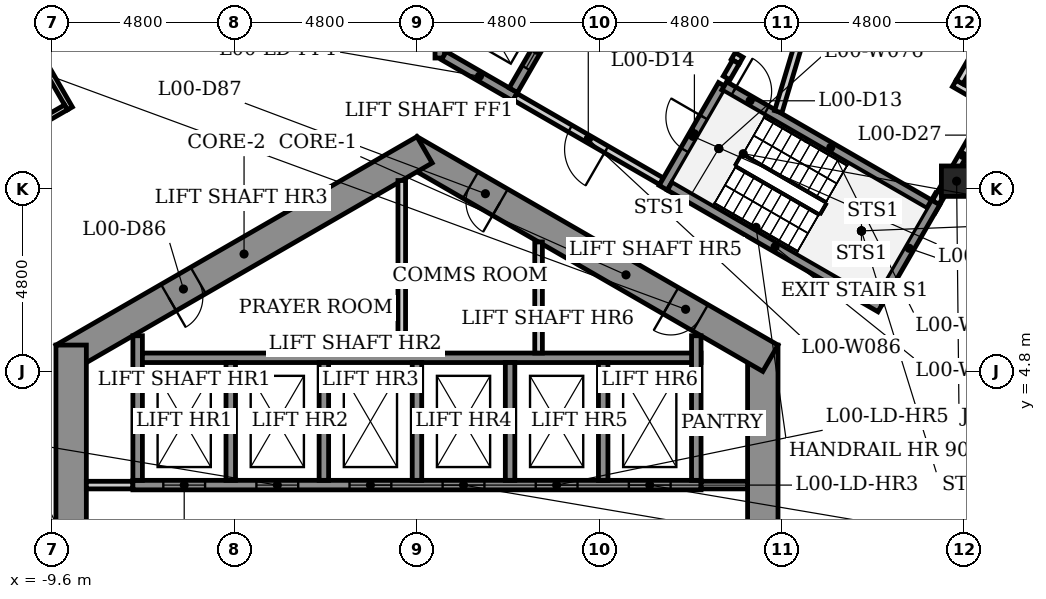
"""IFC4 building model, lengths in metres.
Left out: names, types, materials, properties, quantities, classifications, styles, units other than length and angle.
Written with IfcOpenShell. Run it as: python <this file> out.ifc"""

import sys

from ifc_helpers import new_model, si_unit, direction, frame, frame_2d, origin, origin_2d, place, context, subcontext, project, spatial, rectangle, extrude, element, fill, save


model = new_model("IFC4")
c1 = context("Model", 3, precision=1e-05, world=origin(), true_north=direction((0.0, 1.0)))
c2 = subcontext(c1, "Body", "Model", "MODEL_VIEW")
j1 = project(units=[si_unit("LENGTHUNIT", "METRE"), si_unit("PLANEANGLEUNIT", "RADIAN")], contexts=[c1])
p1 = place(None, origin())
s1 = spatial("IfcSite", under=j1, at=p1, CompositionType="ELEMENT")
p2 = place(p1, origin())
s2 = spatial("IfcBuilding", under=s1, at=p2, CompositionType="ELEMENT")
p3 = place(p2, origin())
s3 = spatial("IfcBuildingStorey", under=s2, at=p3, CompositionType="ELEMENT", Elevation=0.0)
p4 = place(p3, frame((9.1, -5.485, -0.5), z_axis=(0.0, 0.0, 1.0), x_axis=(0.0, 1.0, 0.0)))
e1 = element("IfcWall", 1, at=p4, inside=s3, PredefinedType="SHEAR", context=c2, shape_type="SweptSolid", body=[
    extrude(rectangle(XDim=10.97, YDim=0.8, at=frame_2d((5.485, 0.0))), origin(), (0.0, 0.0, 1.0), 7.5),
])
p5 = place(p4, frame((4.685, 0.0, 0.5)))
e2 = element("IfcOpeningElement", 2, at=p5, cuts=e1, PredefinedType="OPENING", context=c2, shape_type="SweptSolid", body=[
    extrude(rectangle(XDim=1.6, YDim=2.1, at=frame_2d((0.8, 1.05))), frame((0.0, 0.41, 0.0), z_axis=(0.0, -1.0, 0.0), x_axis=(1.0, 0.0, 0.0)), (0.0, 0.0, 1.0), 0.82),
])
p6 = place(p3, frame((9.3, 5.138, -0.5), z_axis=(0.0, 0.0, 1.0), x_axis=(-0.866023993627, 0.500002442456, 0.0)))
e3 = element("IfcWall", 3, at=p6, inside=s3, PredefinedType="SHEAR", context=c2, shape_type="SweptSolid", body=[
    extrude(rectangle(XDim=10.97, YDim=0.8, at=frame_2d((5.485, 0.0))), origin(), (0.0, 0.0, 1.0), 7.5),
])
p7 = place(p6, frame((8.21, 0.0, 0.5)))
e4 = element("IfcOpeningElement", 4, at=p7, cuts=e3, PredefinedType="OPENING", context=c2, shape_type="SweptSolid", body=[
    extrude(rectangle(XDim=0.9, YDim=2.1, at=frame_2d((0.45, 1.05))), frame((0.0, 0.41, 0.0), z_axis=(0.0, -1.0, 0.0), x_axis=(1.0, 0.0, 0.0)), (0.0, 0.0, 1.0), 0.82),
])
p8 = place(p6, frame((2.126, 0.0, 0.5)))
e5 = element("IfcOpeningElement", 5, at=p8, cuts=e3, PredefinedType="OPENING", context=c2, shape_type="SweptSolid", body=[
    extrude(rectangle(XDim=0.9, YDim=2.1, at=frame_2d((0.45, 1.05))), frame((0.0, 0.41, 0.0), z_axis=(0.0, -1.0, 0.0), x_axis=(1.0, 0.0, 0.0)), (0.0, 0.0, 1.0), 0.82),
])
p9 = place(p3, frame((0.2, 10.623, -0.5), z_axis=(0.0, 0.0, 1.0), x_axis=(-0.866023993627, -0.500002442456, 0.0)))
e6 = element("IfcWall", 6, at=p9, inside=s3, PredefinedType="SHEAR", context=c2, shape_type="SweptSolid", body=[
    extrude(rectangle(XDim=10.97, YDim=0.8, at=frame_2d((5.485, 0.0))), origin(), (0.0, 0.0, 1.0), 7.5),
])
p10 = place(p9, frame((6.877, 0.0, 0.5)))
e7 = element("IfcOpeningElement", 7, at=p10, cuts=e6, PredefinedType="OPENING", context=c2, shape_type="SweptSolid", body=[
    extrude(rectangle(XDim=0.9, YDim=2.1, at=frame_2d((0.45, 1.05))), frame((0.0, 0.41, 0.0), z_axis=(0.0, -1.0, 0.0), x_axis=(1.0, 0.0, 0.0)), (0.0, 0.0, 1.0), 0.82),
])
p11 = place(p3, frame((-9.1, 5.485, -0.5), z_axis=(0.0, 0.0, 1.0), x_axis=(0.0, -1.0, 0.0)))
e8 = element("IfcWall", 8, at=p11, inside=s3, PredefinedType="SHEAR", context=c2, shape_type="SweptSolid", body=[
    extrude(rectangle(XDim=10.97, YDim=0.8, at=frame_2d((5.485, 0.0))), origin(), (0.0, 0.0, 1.0), 7.5),
])
p12 = place(p11, frame((4.685, 0.0, 0.5)))
e9 = element("IfcOpeningElement", 9, at=p12, cuts=e8, PredefinedType="OPENING", context=c2, shape_type="SweptSolid", body=[
    extrude(rectangle(XDim=1.6, YDim=2.1, at=frame_2d((0.8, 1.05))), frame((0.0, 0.41, 0.0), z_axis=(0.0, -1.0, 0.0), x_axis=(1.0, 0.0, 0.0)), (0.0, 0.0, 1.0), 0.82),
])
p13 = place(p3, frame((14.2, 9.798, -0.5), z_axis=(0.0, 0.0, 1.0), x_axis=(1.0, 0.0, 0.0)))
e10 = element("IfcColumn", 10, at=p13, inside=s3, PredefinedType="COLUMN", context=c2, shape_type="SweptSolid", body=[
    extrude(rectangle(XDim=0.8, YDim=0.8, at=origin_2d()), origin(), (0.0, 0.0, 1.0), 7.5),
])
p14 = place(p3, frame((-10.208, 13.574, 0.0), z_axis=(0.0, 0.0, 1.0), x_axis=(0.499961633463, -0.866047553582, 0.0)))
e11 = element("IfcWall", 11, at=p14, inside=s3, PredefinedType="PARTITIONING", context=c2, shape_type="SweptSolid", body=[
    extrude(rectangle(XDim=2.15, YDim=0.15, at=frame_2d((1.075, 0.0))), origin(), (0.0, 0.0, 1.0), 6.6),
])
p15 = place(p3, frame((-9.236, 11.74, 0.0), z_axis=(0.0, 0.0, 1.0), x_axis=(-0.86604190943, -0.499971410293, 0.0)))
e12 = element("IfcWall", 12, at=p15, inside=s3, PredefinedType="PARTITIONING", context=c2, shape_type="SweptSolid", body=[
    extrude(rectangle(XDim=8.064, YDim=0.15, at=frame_2d((4.032, 0.0))), origin(), (0.0, 0.0, 1.0), 6.6),
])
p16 = place(p15, frame((2.132, 0.0, 0.0)))
e13 = element("IfcOpeningElement", 13, at=p16, cuts=e12, PredefinedType="OPENING", context=c2, shape_type="SweptSolid", body=[
    extrude(rectangle(XDim=1.6, YDim=2.1, at=frame_2d((0.8, 1.05))), frame((0.0, 0.085, 0.0), z_axis=(0.0, -1.0, 0.0), x_axis=(1.0, 0.0, 0.0)), (0.0, 0.0, 1.0), 0.17),
])
p17 = place(p3, frame((-8.7, 1.8, 0.0), z_axis=(0.0, 0.0, 1.0), x_axis=(1.0, 0.0, 0.0)))
e14 = element("IfcWall", 14, at=p17, inside=s3, PredefinedType="PARTITIONING", context=c2, shape_type="SweptSolid", body=[
    extrude(rectangle(XDim=1.225, YDim=0.2, at=frame_2d((0.613, 0.0))), origin(), (0.0, 0.0, 1.0), 6.6),
])
p18 = place(p3, frame((-7.475, 1.8, 0.0), z_axis=(0.0, 0.0, 1.0), x_axis=(1.0, 0.0, 0.0)))
e15 = element("IfcWall", 15, at=p18, inside=s3, PredefinedType="SHEAR", context=c2, shape_type="SweptSolid", body=[
    extrude(rectangle(XDim=14.95, YDim=0.25, at=frame_2d((7.475, 0.0))), origin(), (0.0, 0.0, 1.0), 6.6),
])
p19 = place(p18, frame((0.8, 0.0, 0.0)))
e16 = element("IfcOpeningElement", 16, at=p19, cuts=e15, PredefinedType="OPENING", context=c2, shape_type="SweptSolid", body=[
    extrude(rectangle(XDim=1.1, YDim=2.1, at=frame_2d((0.55, 1.05))), frame((0.0, 0.135, 0.0), z_axis=(0.0, -1.0, 0.0), x_axis=(1.0, 0.0, 0.0)), (0.0, 0.0, 1.0), 0.27),
])
p20 = place(p18, frame((3.25, 0.0, 0.0)))
e17 = element("IfcOpeningElement", 17, at=p20, cuts=e15, PredefinedType="OPENING", context=c2, shape_type="SweptSolid", body=[
    extrude(rectangle(XDim=1.1, YDim=2.1, at=frame_2d((0.55, 1.05))), frame((0.0, 0.135, 0.0), z_axis=(0.0, -1.0, 0.0), x_axis=(1.0, 0.0, 0.0)), (0.0, 0.0, 1.0), 0.27),
])
p21 = place(p18, frame((5.7, 0.0, 0.0)))
e18 = element("IfcOpeningElement", 18, at=p21, cuts=e15, PredefinedType="OPENING", context=c2, shape_type="SweptSolid", body=[
    extrude(rectangle(XDim=1.1, YDim=2.1, at=frame_2d((0.55, 1.05))), frame((0.0, 0.135, 0.0), z_axis=(0.0, -1.0, 0.0), x_axis=(1.0, 0.0, 0.0)), (0.0, 0.0, 1.0), 0.27),
])
p22 = place(p18, frame((8.15, 0.0, 0.0)))
e19 = element("IfcOpeningElement", 19, at=p22, cuts=e15, PredefinedType="OPENING", context=c2, shape_type="SweptSolid", body=[
    extrude(rectangle(XDim=1.1, YDim=2.1, at=frame_2d((0.55, 1.05))), frame((0.0, 0.135, 0.0), z_axis=(0.0, -1.0, 0.0), x_axis=(1.0, 0.0, 0.0)), (0.0, 0.0, 1.0), 0.27),
])
p23 = place(p18, frame((10.6, 0.0, 0.0)))
e20 = element("IfcOpeningElement", 20, at=p23, cuts=e15, PredefinedType="OPENING", context=c2, shape_type="SweptSolid", body=[
    extrude(rectangle(XDim=1.1, YDim=2.1, at=frame_2d((0.55, 1.05))), frame((0.0, 0.135, 0.0), z_axis=(0.0, -1.0, 0.0), x_axis=(1.0, 0.0, 0.0)), (0.0, 0.0, 1.0), 0.27),
])
p24 = place(p18, frame((13.05, 0.0, 0.0)))
e21 = element("IfcOpeningElement", 21, at=p24, cuts=e15, PredefinedType="OPENING", context=c2, shape_type="SweptSolid", body=[
    extrude(rectangle(XDim=1.1, YDim=2.1, at=frame_2d((0.55, 1.05))), frame((0.0, 0.135, 0.0), z_axis=(0.0, -1.0, 0.0), x_axis=(1.0, 0.0, 0.0)), (0.0, 0.0, 1.0), 0.27),
])
p25 = place(p3, frame((-7.35, 1.925, 0.0), z_axis=(0.0, 0.0, 1.0), x_axis=(0.0, 1.0, 0.0)))
e22 = element("IfcWall", 22, at=p25, inside=s3, PredefinedType="SHEAR", context=c2, shape_type="SweptSolid", body=[
    extrude(rectangle(XDim=3.805, YDim=0.25, at=frame_2d((1.903, 0.0))), origin(), (0.0, 0.0, 1.0), 6.6),
])
p26 = place(p3, frame((-7.225, 5.15, 0.0), z_axis=(0.0, 0.0, 1.0), x_axis=(1.0, 0.0, 0.0)))
e23 = element("IfcWall", 23, at=p26, inside=s3, PredefinedType="SHEAR", context=c2, shape_type="SweptSolid", body=[
    extrude(rectangle(XDim=14.7, YDim=0.25, at=frame_2d((7.35, 0.0))), origin(), (0.0, 0.0, 1.0), 6.6),
])
for number, where, z_axis, x_axis in (
    (24, (-4.9, 5.025, 0.0), (0.0, 0.0, 1.0), (0.0, -1.0, 0.0)),
    (25, (-2.45, 5.025, 0.0), (0.0, 0.0, 1.0), (0.0, -1.0, 0.0)),
):
    element("IfcWall", number, at=place(p3, frame(where, z_axis=z_axis, x_axis=x_axis)), inside=s3, PredefinedType="SHEAR", context=c2, shape_type="SweptSolid", body=[
        extrude(rectangle(XDim=3.1, YDim=0.25, at=frame_2d((1.55, 0.0))), origin(), (0.0, 0.0, 1.0), 7.0),
    ])
p27 = place(p3, frame((-0.4, 9.815, 0.0), z_axis=(0.0, 0.0, 1.0), x_axis=(0.0, -1.0, 0.0)))
e26 = element("IfcWall", 26, at=p27, inside=s3, PredefinedType="PARTITIONING", context=c2, shape_type="SweptSolid", body=[
    extrude(rectangle(XDim=4.54, YDim=0.2, at=frame_2d((2.27, 0.0))), origin(), (0.0, 0.0, 1.0), 6.6),
])
p28 = place(p3, frame((0.0, 5.025, 0.0), z_axis=(0.0, 0.0, 1.0), x_axis=(0.0, -1.0, 0.0)))
e27 = element("IfcWall", 27, at=p28, inside=s3, PredefinedType="SHEAR", context=c2, shape_type="SweptSolid", body=[
    extrude(rectangle(XDim=3.1, YDim=0.25, at=frame_2d((1.55, 0.0))), origin(), (0.0, 0.0, 1.0), 7.0),
])
p29 = place(p3, frame((0.6, 13.039, 0.0), z_axis=(0.0, 0.0, 1.0), x_axis=(0.0, 1.0, 0.0)))
e28 = element("IfcWall", 28, at=p29, inside=s3, PredefinedType="SHEAR", context=c2, shape_type="SweptSolid", body=[
    extrude(rectangle(XDim=0.896, YDim=0.25, at=frame_2d((0.448, 0.0))), origin(), (0.0, 0.0, 1.0), 6.6),
])
p30 = place(p3, frame((2.45, 5.025, 0.0), z_axis=(0.0, 0.0, 1.0), x_axis=(0.0, -1.0, 0.0)))
e29 = element("IfcWall", 29, at=p30, inside=s3, PredefinedType="SHEAR", context=c2, shape_type="SweptSolid", body=[
    extrude(rectangle(XDim=3.1, YDim=0.25, at=frame_2d((1.55, 0.0))), origin(), (0.0, 0.0, 1.0), 7.0),
])
p31 = place(p3, frame((2.581, 12.02, 0.0), z_axis=(0.0, 0.0, 1.0), x_axis=(-0.86603892542, 0.499976579108, 0.0)))
e30 = element("IfcWall", 30, at=p31, inside=s3, PredefinedType="SHEAR", context=c2, shape_type="SweptSolid", body=[
    extrude(rectangle(XDim=2.162, YDim=0.25, at=frame_2d((1.081, 0.0))), origin(), (0.0, 0.0, 1.0), 6.6),
])
p32 = place(p3, frame((2.535, 12.191, 0.0), z_axis=(0.0, 0.0, 1.0), x_axis=(0.500061746146, 0.865989751695, 0.0)))
e31 = element("IfcWall", 31, at=p32, inside=s3, PredefinedType="SHEAR", context=c2, shape_type="SweptSolid", body=[
    extrude(rectangle(XDim=2.45, YDim=0.25, at=frame_2d((1.225, 0.0))), origin(), (0.0, 0.0, 1.0), 7.0),
])
p33 = place(p32, frame((0.675, 0.0, 0.0)))
e32 = element("IfcOpeningElement", 32, at=p33, cuts=e31, PredefinedType="OPENING", context=c2, shape_type="SweptSolid", body=[
    extrude(rectangle(XDim=1.1, YDim=2.1, at=frame_2d((0.55, 1.05))), frame((0.0, 0.135, 0.0), z_axis=(0.0, -1.0, 0.0), x_axis=(1.0, 0.0, 0.0)), (0.0, 0.0, 1.0), 0.27),
])
p34 = place(p3, frame((3.2, 8.198, 0.0), z_axis=(0.0, 0.0, 1.0), x_axis=(0.0, -1.0, 0.0)))
e33 = element("IfcWall", 33, at=p34, inside=s3, PredefinedType="PARTITIONING", context=c2, shape_type="SweptSolid", body=[
    extrude(rectangle(XDim=2.924, YDim=0.2, at=frame_2d((1.462, 0.0))), origin(), (0.0, 0.0, 1.0), 6.6),
])
p35 = place(p3, frame((4.9, 5.025, 0.0), z_axis=(0.0, 0.0, 1.0), x_axis=(0.0, -1.0, 0.0)))
e34 = element("IfcWall", 34, at=p35, inside=s3, PredefinedType="SHEAR", context=c2, shape_type="SweptSolid", body=[
    extrude(rectangle(XDim=3.1, YDim=0.25, at=frame_2d((1.55, 0.0))), origin(), (0.0, 0.0, 1.0), 7.0),
])
p36 = place(p3, frame((6.435, 9.795, 0.0), z_axis=(0.0, 0.0, 1.0), x_axis=(-0.866012907634, 0.500021643343, 0.0)))
e35 = element("IfcWall", 35, at=p36, inside=s3, PredefinedType="PARTITIONING", context=c2, shape_type="SweptSolid", body=[
    extrude(rectangle(XDim=4.45, YDim=0.2, at=frame_2d((2.225, 0.0))), origin(), (0.0, 0.0, 1.0), 6.6),
])
p37 = place(p36, frame((1.675, 0.0, 0.0)))
e36 = element("IfcOpeningElement", 36, at=p37, cuts=e35, PredefinedType="OPENING", context=c2, shape_type="SweptSolid", body=[
    extrude(rectangle(XDim=1.1, YDim=2.1, at=frame_2d((0.55, 1.05))), frame((0.0, 0.11, 0.0), z_axis=(0.0, -1.0, 0.0), x_axis=(1.0, 0.0, 0.0)), (0.0, 0.0, 1.0), 0.22),
])
p38 = place(p3, frame((6.48, 9.624, 0.0), z_axis=(0.0, 0.0, 1.0), x_axis=(0.500004234368, 0.866022959057, 0.0)))
e37 = element("IfcWall", 37, at=p38, inside=s3, PredefinedType="SHEAR", context=c2, shape_type="SweptSolid", body=[
    extrude(rectangle(XDim=3.125, YDim=0.25, at=frame_2d((1.562, 0.0))), origin(), (0.0, 0.0, 1.0), 6.6),
])
p39 = place(p38, frame((1.14, 0.0, 0.0)))
e38 = element("IfcOpeningElement", 38, at=p39, cuts=e37, PredefinedType="OPENING", context=c2, shape_type="SweptSolid", body=[
    extrude(rectangle(XDim=1.0, YDim=2.1, at=frame_2d((0.5, 1.05))), frame((0.0, 0.135, 0.0), z_axis=(0.0, -1.0, 0.0), x_axis=(1.0, 0.0, 0.0)), (0.0, 0.0, 1.0), 0.27),
])
p40 = place(p3, frame((7.475, 1.8, 0.0), z_axis=(0.0, 0.0, 1.0), x_axis=(1.0, 0.0, 0.0)))
e39 = element("IfcWall", 39, at=p40, inside=s3, PredefinedType="PARTITIONING", context=c2, shape_type="SweptSolid", body=[
    extrude(rectangle(XDim=1.225, YDim=0.2, at=frame_2d((0.613, 0.0))), origin(), (0.0, 0.0, 1.0), 6.6),
])
p41 = place(p3, frame((7.35, 5.73, 0.0), z_axis=(0.0, 0.0, 1.0), x_axis=(0.0, -1.0, 0.0)))
e40 = element("IfcWall", 40, at=p41, inside=s3, PredefinedType="SHEAR", context=c2, shape_type="SweptSolid", body=[
    extrude(rectangle(XDim=3.805, YDim=0.25, at=frame_2d((1.903, 0.0))), origin(), (0.0, 0.0, 1.0), 6.6),
])
p42 = place(p3, frame((8.086, 12.306, 0.0), z_axis=(0.0, 0.0, 1.0), x_axis=(0.866027988781, -0.499995522627, 0.0)))
e41 = element("IfcWall", 41, at=p42, inside=s3, PredefinedType="SHEAR", context=c2, shape_type="SweptSolid", body=[
    extrude(rectangle(XDim=6.475, YDim=0.25, at=frame_2d((3.238, 0.0))), origin(), (0.0, 0.0, 1.0), 6.6),
])
p43 = place(p42, frame((0.285, 0.0, 0.0)))
e42 = element("IfcOpeningElement", 42, at=p43, cuts=e41, PredefinedType="OPENING", context=c2, shape_type="SweptSolid", body=[
    extrude(rectangle(XDim=1.0, YDim=2.1, at=frame_2d((0.5, 1.05))), frame((0.0, 0.135, 0.0), z_axis=(0.0, -1.0, 0.0), x_axis=(1.0, 0.0, 0.0)), (0.0, 0.0, 1.0), 0.27),
])
p44 = place(p3, frame((8.322, 13.093, 0.0), z_axis=(0.0, 0.0, 1.0), x_axis=(0.865658885915, -0.500634290912, 0.0)))
e43 = element("IfcWall", 43, at=p44, inside=s3, PredefinedType="PARTITIONING", context=c2, shape_type="SweptSolid", body=[
    extrude(rectangle(XDim=0.24, YDim=0.2, at=frame_2d((0.12, 0.0))), origin(), (0.0, 0.0, 1.0), 6.6),
])
p45 = place(p3, frame((8.393, 12.937, 0.0), z_axis=(0.0, 0.0, 1.0), x_axis=(-0.499895202697, -0.866085900082, 0.0)))
e44 = element("IfcWall", 44, at=p45, inside=s3, PredefinedType="PARTITIONING", context=c2, shape_type="SweptSolid", body=[
    extrude(rectangle(XDim=0.489, YDim=0.2, at=frame_2d((0.245, 0.0))), origin(), (0.0, 0.0, 1.0), 6.6),
])
p46 = place(p3, frame((9.508, 11.625, 0.0), z_axis=(0.0, 0.0, 1.0), x_axis=(0.286880018175, 0.957966520904, 0.0)))
e45 = element("IfcWall", 45, at=p46, inside=s3, PredefinedType="PLUMBINGWALL", context=c2, shape_type="SweptSolid", body=[
    extrude(rectangle(XDim=6.128, YDim=0.2, at=frame_2d((3.064, 0.0))), origin(), (0.0, 0.0, 1.0), 6.6),
])
p47 = place(p3, frame((12.194, 6.47, 0.0), z_axis=(0.0, 0.0, 1.0), x_axis=(-0.866025499775, 0.499999833739, 0.0)))
e46 = element("IfcWall", 46, at=p47, inside=s3, PredefinedType="SHEAR", context=c2, shape_type="SweptSolid", body=[
    extrude(rectangle(XDim=6.4, YDim=0.25, at=frame_2d((3.2, 0.0))), origin(), (0.0, 0.0, 1.0), 6.6),
])
p48 = place(p3, frame((13.755, 9.424, 0.0), z_axis=(0.0, 0.0, 1.0), x_axis=(-0.500011789842, -0.866018596809, 0.0)))
e47 = element("IfcWall", 47, at=p48, inside=s3, PredefinedType="SHEAR", context=c2, shape_type="SweptSolid", body=[
    extrude(rectangle(XDim=3.214, YDim=0.25, at=frame_2d((1.607, 0.0))), origin(), (0.0, 0.0, 1.0), 6.6),
])
p49 = place(p3, frame((14.141, 12.372, 0.0), z_axis=(0.0, 0.0, 1.0), x_axis=(0.866028115054, -0.499995303914, 0.0)))
e48 = element("IfcWall", 48, at=p49, inside=s3, PredefinedType="PLUMBINGWALL", context=c2, shape_type="SweptSolid", body=[
    extrude(rectangle(XDim=1.239, YDim=0.2, at=frame_2d((0.62, 0.0))), origin(), (0.0, 0.0, 1.0), 6.6),
])
p50 = place(p3, frame((15.078, 11.715, 0.0), z_axis=(0.0, 0.0, 1.0), x_axis=(-0.499958946799, -0.866049104564, 0.0)))
e49 = element("IfcWall", 49, at=p50, inside=s3, PredefinedType="PLUMBINGWALL", context=c2, shape_type="SweptSolid", body=[
    extrude(rectangle(XDim=2.86, YDim=0.2, at=frame_2d((1.43, 0.0))), origin(), (0.0, 0.0, 1.0), 6.6),
])
p51 = place(p3, frame((15.778, 15.006, 0.0), z_axis=(0.0, 0.0, 1.0), x_axis=(-0.50002537861, -0.866010750942, 0.0)))
e50 = element("IfcWall", 50, at=p51, inside=s3, PredefinedType="PLUMBINGWALL", context=c2, shape_type="SweptSolid", body=[
    extrude(rectangle(XDim=3.0, YDim=0.2, at=frame_2d((1.5, 0.0))), origin(), (0.0, 0.0, 1.0), 6.6),
])
p52 = place(p19, origin())
e51 = element("IfcDoor", 51, at=p52, inside=s3, OperationType="SLIDING_TO_LEFT", PredefinedType="DOOR", context=c2, shape_type="SweptSolid", body=[
    extrude(rectangle(XDim=1.1, YDim=2.1, at=frame_2d((0.55, 1.05))), frame((0.0, 0.025, 0.0), z_axis=(0.0, -1.0, 0.0), x_axis=(1.0, 0.0, 0.0)), (0.0, 0.0, 1.0), 0.05),
])
fill(e16, e51)
p53 = place(p20, origin())
e52 = element("IfcDoor", 52, at=p53, inside=s3, OperationType="SLIDING_TO_LEFT", PredefinedType="DOOR", context=c2, shape_type="SweptSolid", body=[
    extrude(rectangle(XDim=1.1, YDim=2.1, at=frame_2d((0.55, 1.05))), frame((0.0, 0.025, 0.0), z_axis=(0.0, -1.0, 0.0), x_axis=(1.0, 0.0, 0.0)), (0.0, 0.0, 1.0), 0.05),
])
fill(e17, e52)
p54 = place(p21, origin())
e53 = element("IfcDoor", 53, at=p54, inside=s3, OperationType="SLIDING_TO_LEFT", PredefinedType="DOOR", context=c2, shape_type="SweptSolid", body=[
    extrude(rectangle(XDim=1.1, YDim=2.1, at=frame_2d((0.55, 1.05))), frame((0.0, 0.025, 0.0), z_axis=(0.0, -1.0, 0.0), x_axis=(1.0, 0.0, 0.0)), (0.0, 0.0, 1.0), 0.05),
])
fill(e18, e53)
p55 = place(p22, origin())
e54 = element("IfcDoor", 54, at=p55, inside=s3, OperationType="SLIDING_TO_LEFT", PredefinedType="DOOR", context=c2, shape_type="SweptSolid", body=[
    extrude(rectangle(XDim=1.1, YDim=2.1, at=frame_2d((0.55, 1.05))), frame((0.0, 0.025, 0.0), z_axis=(0.0, -1.0, 0.0), x_axis=(1.0, 0.0, 0.0)), (0.0, 0.0, 1.0), 0.05),
])
fill(e19, e54)
p56 = place(p23, origin())
e55 = element("IfcDoor", 55, at=p56, inside=s3, OperationType="SLIDING_TO_LEFT", PredefinedType="DOOR", context=c2, shape_type="SweptSolid", body=[
    extrude(rectangle(XDim=1.1, YDim=2.1, at=frame_2d((0.55, 1.05))), frame((0.0, 0.025, 0.0), z_axis=(0.0, -1.0, 0.0), x_axis=(1.0, 0.0, 0.0)), (0.0, 0.0, 1.0), 0.05),
])
fill(e20, e55)
p57 = place(p24, origin())
e56 = element("IfcDoor", 56, at=p57, inside=s3, OperationType="SLIDING_TO_LEFT", PredefinedType="DOOR", context=c2, shape_type="SweptSolid", body=[
    extrude(rectangle(XDim=1.1, YDim=2.1, at=frame_2d((0.55, 1.05))), frame((0.0, 0.025, 0.0), z_axis=(0.0, -1.0, 0.0), x_axis=(1.0, 0.0, 0.0)), (0.0, 0.0, 1.0), 0.05),
])
fill(e21, e56)
p58 = place(p43, origin())
e57 = element("IfcDoor", 57, at=p58, inside=s3, OperationType="SINGLE_SWING_LEFT", PredefinedType="DOOR", context=c2, shape_type="SweptSolid", body=[
    extrude(rectangle(XDim=1.0, YDim=2.1, at=frame_2d((0.5, 1.05))), frame((0.0, 0.025, 0.0), z_axis=(0.0, -1.0, 0.0), x_axis=(1.0, 0.0, 0.0)), (0.0, 0.0, 1.0), 0.05),
])
fill(e42, e57)
p59 = place(p39, origin())
e58 = element("IfcDoor", 58, at=p59, inside=s3, OperationType="SINGLE_SWING_RIGHT", PredefinedType="DOOR", context=c2, shape_type="SweptSolid", body=[
    extrude(rectangle(XDim=1.0, YDim=2.1, at=frame_2d((0.5, 1.05))), frame((0.0, 0.025, 0.0), z_axis=(0.0, -1.0, 0.0), x_axis=(1.0, 0.0, 0.0)), (0.0, 0.0, 1.0), 0.05),
])
fill(e38, e58)
p60 = place(p37, origin())
e59 = element("IfcDoor", 59, at=p60, inside=s3, OperationType="SINGLE_SWING_LEFT", PredefinedType="DOOR", context=c2, shape_type="SweptSolid", body=[
    extrude(rectangle(XDim=1.1, YDim=2.1, at=frame_2d((0.55, 1.05))), frame((0.0, 0.025, 0.0), z_axis=(0.0, -1.0, 0.0), x_axis=(1.0, 0.0, 0.0)), (0.0, 0.0, 1.0), 0.05),
])
fill(e36, e59)
p61 = place(p33, origin())
e60 = element("IfcDoor", 60, at=p61, inside=s3, OperationType="SLIDING_TO_LEFT", PredefinedType="DOOR", context=c2, shape_type="SweptSolid", body=[
    extrude(rectangle(XDim=1.1, YDim=2.1, at=frame_2d((0.55, 1.05))), frame((0.0, 0.025, 0.0), z_axis=(0.0, -1.0, 0.0), x_axis=(1.0, 0.0, 0.0)), (0.0, 0.0, 1.0), 0.05),
])
fill(e32, e60)
p62 = place(p10, origin())
e61 = element("IfcDoor", 61, at=p62, inside=s3, OperationType="SINGLE_SWING_RIGHT", PredefinedType="DOOR", context=c2, shape_type="SweptSolid", body=[
    extrude(rectangle(XDim=0.9, YDim=2.1, at=frame_2d((0.45, 1.05))), frame((0.0, 0.025, 0.0), z_axis=(0.0, -1.0, 0.0), x_axis=(1.0, 0.0, 0.0)), (0.0, 0.0, 1.0), 0.05),
])
fill(e7, e61)
p63 = place(p7, origin())
e62 = element("IfcDoor", 62, at=p63, inside=s3, OperationType="SINGLE_SWING_LEFT", PredefinedType="DOOR", context=c2, shape_type="SweptSolid", body=[
    extrude(rectangle(XDim=0.9, YDim=2.1, at=frame_2d((0.45, 1.05))), frame((0.0, 0.025, 0.0), z_axis=(0.0, -1.0, 0.0), x_axis=(1.0, 0.0, 0.0)), (0.0, 0.0, 1.0), 0.05),
])
fill(e4, e62)
p64 = place(p8, origin())
e63 = element("IfcDoor", 63, at=p64, inside=s3, OperationType="SINGLE_SWING_RIGHT", PredefinedType="DOOR", context=c2, shape_type="SweptSolid", body=[
    extrude(rectangle(XDim=0.9, YDim=2.1, at=frame_2d((0.45, 1.05))), frame((0.0, 0.025, 0.0), z_axis=(0.0, -1.0, 0.0), x_axis=(1.0, 0.0, 0.0)), (0.0, 0.0, 1.0), 0.05),
])
fill(e5, e63)
save(model, sys.argv[1])
